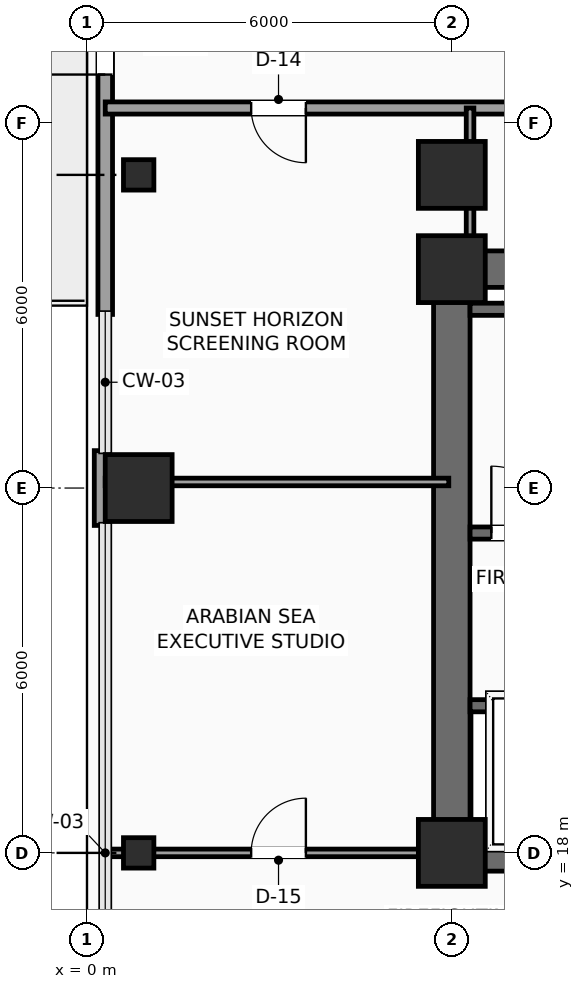
"""IFC4 building model, lengths in metres.
Left out: names, types, materials, properties, quantities, classifications, styles, units other than length and angle.
Written with IfcOpenShell. Run it as: python <this file> out.ifc"""

import sys

from ifc_helpers import new_model, si_unit, direction, frame, frame_2d, origin, origin_2d, place, context, subcontext, project, spatial, rectangle, hollow_rectangle, extrude, element, fill, save


model = new_model("IFC4")
c1 = context("Model", 3, precision=1e-05, world=origin(), true_north=direction((0.0, 1.0)))
c2 = subcontext(c1, "Body", "Model", "MODEL_VIEW")
j1 = project(units=[si_unit("LENGTHUNIT", "METRE"), si_unit("PLANEANGLEUNIT", "RADIAN")], contexts=[c1])
p1 = place(None, origin())
s1 = spatial("IfcSite", under=j1, at=p1, CompositionType="ELEMENT")
p2 = place(p1, origin())
s2 = spatial("IfcBuilding", under=s1, at=p2, CompositionType="ELEMENT")
p3 = place(p2, frame((0.0, 0.0, 149.4)))
s3 = spatial("IfcBuildingStorey", under=s2, at=p3, CompositionType="ELEMENT", Elevation=149.4)
for number, where, z_axis, x_axis in (
    (1, (6.0, 18.0, 0.0), (0.0, 0.0, 1.0), (1.0, 0.0, 0.0)),
    (2, (6.0, 27.6, 0.0), (0.0, 0.0, 1.0), (1.0, 0.0, 0.0)),
):
    element("IfcColumn", number, at=place(p3, frame(where, z_axis=z_axis, x_axis=x_axis)), inside=s3, PredefinedType="COLUMN", context=c2, shape_type="SweptSolid", body=[
        extrude(rectangle(XDim=1.1, YDim=1.1, at=origin_2d()), origin(), (0.0, 0.0, 1.0), 3.75),
    ])
p4 = place(p3, frame((0.85, 18.0, 0.0), z_axis=(0.0, 0.0, 1.0), x_axis=(1.0, 0.0, 0.0)))
e3 = element("IfcColumn", 3, at=p4, inside=s3, PredefinedType="COLUMN", context=c2, shape_type="SweptSolid", body=[
    extrude(hollow_rectangle(XDim=0.5, YDim=0.5, WallThickness=0.025, InnerFilletRadius=0.025, OuterFilletRadius=0.04, at=origin_2d()), origin(), (0.0, 0.0, 1.0), 3.75),
])
p5 = place(p3, frame((0.85, 24.0, 0.0), z_axis=(0.0, 0.0, 1.0), x_axis=(1.0, 0.0, 0.0)))
e4 = element("IfcColumn", 4, at=p5, inside=s3, PredefinedType="COLUMN", context=c2, shape_type="SweptSolid", body=[
    extrude(rectangle(XDim=1.1, YDim=1.1, at=origin_2d()), origin(), (0.0, 0.0, 1.0), 3.75),
])
p6 = place(p3, frame((0.85, 29.15, 0.0), z_axis=(0.0, 0.0, 1.0), x_axis=(1.0, 0.0, 0.0)))
e5 = element("IfcColumn", 5, at=p6, inside=s3, PredefinedType="COLUMN", context=c2, shape_type="SweptSolid", body=[
    extrude(hollow_rectangle(XDim=0.5, YDim=0.5, WallThickness=0.025, InnerFilletRadius=0.025, OuterFilletRadius=0.04, at=origin_2d()), origin(), (0.0, 0.0, 1.0), 3.75),
])
p7 = place(p3, frame((6.0, 29.15, 0.0), z_axis=(0.0, 0.0, 1.0), x_axis=(1.0, 0.0, 0.0)))
e6 = element("IfcColumn", 6, at=p7, inside=s3, PredefinedType="COLUMN", context=c2, shape_type="SweptSolid", body=[
    extrude(rectangle(XDim=1.1, YDim=1.1, at=origin_2d()), origin(), (0.0, 0.0, 1.0), 3.75),
])
p8 = place(p3, frame((0.3, 26.855, 0.0), z_axis=(0.0, 0.0, 1.0), x_axis=(0.0, 1.0, 0.0)))
e7 = element("IfcWall", 7, at=p8, inside=s3, PredefinedType="SOLIDWALL", context=c2, shape_type="SweptSolid", body=[
    extrude(rectangle(XDim=9.29, YDim=0.24, at=frame_2d((4.645, 0.0))), origin(), (0.0, 0.0, 1.0), 3.525),
])
p9 = place(p8, frame((3.945, 0.0, 0.0)))
e8 = element("IfcOpeningElement", 8, at=p9, cuts=e7, PredefinedType="OPENING", context=c2, shape_type="SweptSolid", body=[
    extrude(rectangle(XDim=1.05, YDim=2.2, at=frame_2d((0.525, 1.1))), frame((0.0, 0.13, 0.0), z_axis=(0.0, -1.0, 0.0), x_axis=(1.0, 0.0, 0.0)), (0.0, 0.0, 1.0), 0.26),
])
p10 = place(p3, frame((0.24, 23.385, 0.0), z_axis=(0.0, 0.0, 1.0), x_axis=(0.0, 1.0, 0.0)))
e9 = element("IfcWall", 9, at=p10, inside=s3, PredefinedType="SOLIDWALL", context=c2, shape_type="SweptSolid", body=[
    extrude(rectangle(XDim=1.23, YDim=0.24, at=frame_2d((0.615, 0.0))), origin(), (0.0, 0.0, 1.0), 3.525),
])
p11 = place(p3, frame((6.0, 18.0, 0.0), z_axis=(0.0, 0.0, 1.0), x_axis=(1.0, 0.0, 0.0)))
e10 = element("IfcWall", 10, at=p11, inside=s3, PredefinedType="SHEAR", context=c2, shape_type="SweptSolid", body=[
    extrude(rectangle(XDim=12.0, YDim=0.6, at=frame_2d((6.0, 0.0))), origin(), (0.0, 0.0, 1.0), 3.525),
])
p12 = place(p11, frame((7.15, 0.0, 0.0)))
e11 = element("IfcOpeningElement", 11, at=p12, cuts=e10, PredefinedType="OPENING", context=c2, shape_type="SweptSolid", body=[
    extrude(rectangle(XDim=1.6, YDim=2.3, at=frame_2d((0.8, 1.15))), frame((0.0, 0.31, 0.0), z_axis=(0.0, -1.0, 0.0), x_axis=(1.0, 0.0, 0.0)), (0.0, 0.0, 1.0), 0.62),
])
p13 = place(p3, frame((6.0, 27.6, 0.0), z_axis=(0.0, 0.0, 1.0), x_axis=(1.0, 0.0, 0.0)))
e12 = element("IfcWall", 12, at=p13, inside=s3, PredefinedType="SHEAR", context=c2, shape_type="SweptSolid", body=[
    extrude(rectangle(XDim=12.0, YDim=0.6, at=frame_2d((6.0, 0.0))), origin(), (0.0, 0.0, 1.0), 3.525),
])
p14 = place(p13, frame((10.2, 0.0, 0.0)))
e13 = element("IfcOpeningElement", 13, at=p14, cuts=e12, PredefinedType="OPENING", context=c2, shape_type="SweptSolid", body=[
    extrude(rectangle(XDim=0.9, YDim=2.15, at=frame_2d((0.45, 1.075))), frame((0.0, 0.31, 0.0), z_axis=(0.0, -1.0, 0.0), x_axis=(1.0, 0.0, 0.0)), (0.0, 0.0, 1.0), 0.62),
])
p15 = place(p3, frame((6.0, 18.0, 0.0), z_axis=(0.0, 0.0, 1.0), x_axis=(0.0, 1.0, 0.0)))
e14 = element("IfcWall", 14, at=p15, inside=s3, PredefinedType="SHEAR", context=c2, shape_type="SweptSolid", body=[
    extrude(rectangle(XDim=9.6, YDim=0.6, at=frame_2d((4.8, 0.0))), origin(), (0.0, 0.0, 1.0), 3.525),
])
p16 = place(p3, frame((6.3, 23.26, 0.0), z_axis=(0.0, 0.0, 1.0), x_axis=(1.0, 0.0, 0.0)))
e15 = element("IfcWall", 15, at=p16, inside=s3, PredefinedType="SHEAR", context=c2, shape_type="SweptSolid", body=[
    extrude(rectangle(XDim=8.88, YDim=0.2, at=frame_2d((4.44, 0.0))), origin(), (0.0, 0.0, 1.0), 3.525),
])
p17 = place(p16, frame((0.35, 0.0, 0.0)))
e16 = element("IfcOpeningElement", 16, at=p17, cuts=e15, PredefinedType="OPENING", context=c2, shape_type="SweptSolid", body=[
    extrude(rectangle(XDim=1.1, YDim=2.2, at=frame_2d((0.55, 1.1))), frame((0.0, 0.11, 0.0), z_axis=(0.0, -1.0, 0.0), x_axis=(1.0, 0.0, 0.0)), (0.0, 0.0, 1.0), 0.22),
])
p18 = place(p3, frame((6.3, 26.94, 0.0), z_axis=(0.0, 0.0, 1.0), x_axis=(1.0, 0.0, 0.0)))
e17 = element("IfcWall", 17, at=p18, inside=s3, PredefinedType="SHEAR", context=c2, shape_type="SweptSolid", body=[
    extrude(rectangle(XDim=8.88, YDim=0.2, at=frame_2d((4.44, 0.0))), origin(), (0.0, 0.0, 1.0), 3.525),
])
p19 = place(p3, frame((6.3, 20.42, 0.0), z_axis=(0.0, 0.0, 1.0), x_axis=(1.0, 0.0, 0.0)))
e18 = element("IfcWall", 18, at=p19, inside=s3, PredefinedType="SHEAR", context=c2, shape_type="SweptSolid", body=[
    extrude(rectangle(XDim=4.95, YDim=0.2, at=frame_2d((2.475, 0.0))), origin(), (0.0, 0.0, 1.0), 3.525),
])
p20 = place(p19, frame((0.65, 0.0, 0.0)))
e19 = element("IfcOpeningElement", 19, at=p20, cuts=e18, PredefinedType="OPENING", context=c2, shape_type="SweptSolid", body=[
    extrude(rectangle(XDim=1.1, YDim=2.2, at=frame_2d((0.55, 1.1))), frame((0.0, 0.11, 0.0), z_axis=(0.0, -1.0, 0.0), x_axis=(1.0, 0.0, 0.0)), (0.0, 0.0, 1.0), 0.22),
])
p21 = place(p19, frame((3.05, 0.0, 0.0)))
e20 = element("IfcOpeningElement", 20, at=p21, cuts=e18, PredefinedType="OPENING", context=c2, shape_type="SweptSolid", body=[
    extrude(rectangle(XDim=1.1, YDim=2.2, at=frame_2d((0.55, 1.1))), frame((0.0, 0.11, 0.0), z_axis=(0.0, -1.0, 0.0), x_axis=(1.0, 0.0, 0.0)), (0.0, 0.0, 1.0), 0.22),
])
p22 = place(p3, frame((15.88, 30.25, 0.0), z_axis=(0.0, 0.0, 1.0), x_axis=(-1.0, 0.0, 0.0)))
e21 = element("IfcWall", 21, at=p22, inside=s3, PredefinedType="SOLIDWALL", context=c2, shape_type="SweptSolid", body=[
    extrude(rectangle(XDim=15.58, YDim=0.2, at=frame_2d((7.79, 0.0))), origin(), (0.0, 0.0, 1.0), 3.525),
])
p23 = place(p22, frame((12.28, 0.0, 0.0)))
e22 = element("IfcOpeningElement", 22, at=p23, cuts=e21, PredefinedType="OPENING", context=c2, shape_type="SweptSolid", body=[
    extrude(rectangle(XDim=0.9, YDim=2.1, at=frame_2d((0.45, 1.05))), frame((0.0, 0.11, 0.0), z_axis=(0.0, -1.0, 0.0), x_axis=(1.0, 0.0, 0.0)), (0.0, 0.0, 1.0), 0.22),
])
p24 = place(p22, frame((6.73, 0.0, 0.0)))
e23 = element("IfcOpeningElement", 23, at=p24, cuts=e21, PredefinedType="OPENING", context=c2, shape_type="SweptSolid", body=[
    extrude(rectangle(XDim=0.9, YDim=2.1, at=frame_2d((0.45, 1.05))), frame((0.0, 0.11, 0.0), z_axis=(0.0, -1.0, 0.0), x_axis=(1.0, 0.0, 0.0)), (0.0, 0.0, 1.0), 0.22),
])
p25 = place(p22, frame((1.98, 0.0, 0.0)))
e24 = element("IfcOpeningElement", 24, at=p25, cuts=e21, PredefinedType="OPENING", context=c2, shape_type="SweptSolid", body=[
    extrude(rectangle(XDim=0.9, YDim=2.1, at=frame_2d((0.45, 1.05))), frame((0.0, 0.11, 0.0), z_axis=(0.0, -1.0, 0.0), x_axis=(1.0, 0.0, 0.0)), (0.0, 0.0, 1.0), 0.22),
])
p26 = place(p3, frame((0.3, 18.0, 0.0), z_axis=(0.0, 0.0, 1.0), x_axis=(1.0, 0.0, 0.0)))
e25 = element("IfcWall", 25, at=p26, inside=s3, PredefinedType="PARTITIONING", context=c2, shape_type="SweptSolid", body=[
    extrude(rectangle(XDim=5.65, YDim=0.125, at=frame_2d((2.825, 0.0))), origin(), (0.0, 0.0, 1.0), 3.017),
])
p27 = place(p26, frame((2.4, 0.0, 0.0)))
e26 = element("IfcOpeningElement", 26, at=p27, cuts=e25, PredefinedType="OPENING", context=c2, shape_type="SweptSolid", body=[
    extrude(rectangle(XDim=0.9, YDim=2.1, at=frame_2d((0.45, 1.05))), frame((0.0, 0.073, 0.0), z_axis=(0.0, -1.0, 0.0), x_axis=(1.0, 0.0, 0.0)), (0.0, 0.0, 1.0), 0.145),
])
p28 = place(p3, frame((0.3, 24.1, 0.0), z_axis=(0.0, 0.0, 1.0), x_axis=(1.0, 0.0, 0.0)))
e27 = element("IfcWall", 27, at=p28, inside=s3, PredefinedType="PARTITIONING", context=c2, shape_type="SweptSolid", body=[
    extrude(rectangle(XDim=5.65, YDim=0.125, at=frame_2d((2.825, 0.0))), origin(), (0.0, 0.0, 1.0), 3.525),
])
p29 = place(p3, frame((6.3, 27.65, 0.0), z_axis=(0.0, 0.0, 1.0), x_axis=(0.0, 1.0, 0.0)))
e28 = element("IfcWall", 28, at=p29, inside=s3, PredefinedType="PARTITIONING", context=c2, shape_type="SweptSolid", body=[
    extrude(rectangle(XDim=2.6, YDim=0.125, at=frame_2d((1.3, 0.0))), origin(), (0.0, 0.0, 1.0), 3.525),
])
p30 = place(p9, origin())
e29 = element("IfcDoor", 29, at=p30, inside=s3, OperationType="SINGLE_SWING_LEFT", PredefinedType="DOOR", context=c2, shape_type="SweptSolid", body=[
    extrude(rectangle(XDim=1.05, YDim=2.2, at=frame_2d((0.525, 1.1))), frame((0.0, 0.025, 0.0), z_axis=(0.0, -1.0, 0.0), x_axis=(1.0, 0.0, 0.0)), (0.0, 0.0, 1.0), 0.05),
])
fill(e8, e29)
p31 = place(p17, origin())
e30 = element("IfcDoor", 30, at=p31, inside=s3, OperationType="SINGLE_SWING_LEFT", PredefinedType="DOOR", context=c2, shape_type="SweptSolid", body=[
    extrude(rectangle(XDim=1.1, YDim=2.2, at=frame_2d((0.55, 1.1))), frame((0.0, 0.025, 0.0), z_axis=(0.0, -1.0, 0.0), x_axis=(1.0, 0.0, 0.0)), (0.0, 0.0, 1.0), 0.05),
])
fill(e16, e30)
p32 = place(p23, origin())
e31 = element("IfcDoor", 31, at=p32, inside=s3, OperationType="SINGLE_SWING_LEFT", PredefinedType="DOOR", context=c2, shape_type="SweptSolid", body=[
    extrude(rectangle(XDim=0.9, YDim=2.1, at=frame_2d((0.45, 1.05))), frame((0.0, 0.025, 0.0), z_axis=(0.0, -1.0, 0.0), x_axis=(1.0, 0.0, 0.0)), (0.0, 0.0, 1.0), 0.05),
])
fill(e22, e31)
p33 = place(p27, origin())
e32 = element("IfcDoor", 32, at=p33, inside=s3, OperationType="SINGLE_SWING_RIGHT", PredefinedType="DOOR", context=c2, shape_type="SweptSolid", body=[
    extrude(rectangle(XDim=0.9, YDim=2.1, at=frame_2d((0.45, 1.05))), frame((0.0, 0.025, 0.0), z_axis=(0.0, -1.0, 0.0), x_axis=(1.0, 0.0, 0.0)), (0.0, 0.0, 1.0), 0.05),
])
fill(e26, e32)
save(model, sys.argv[1])
